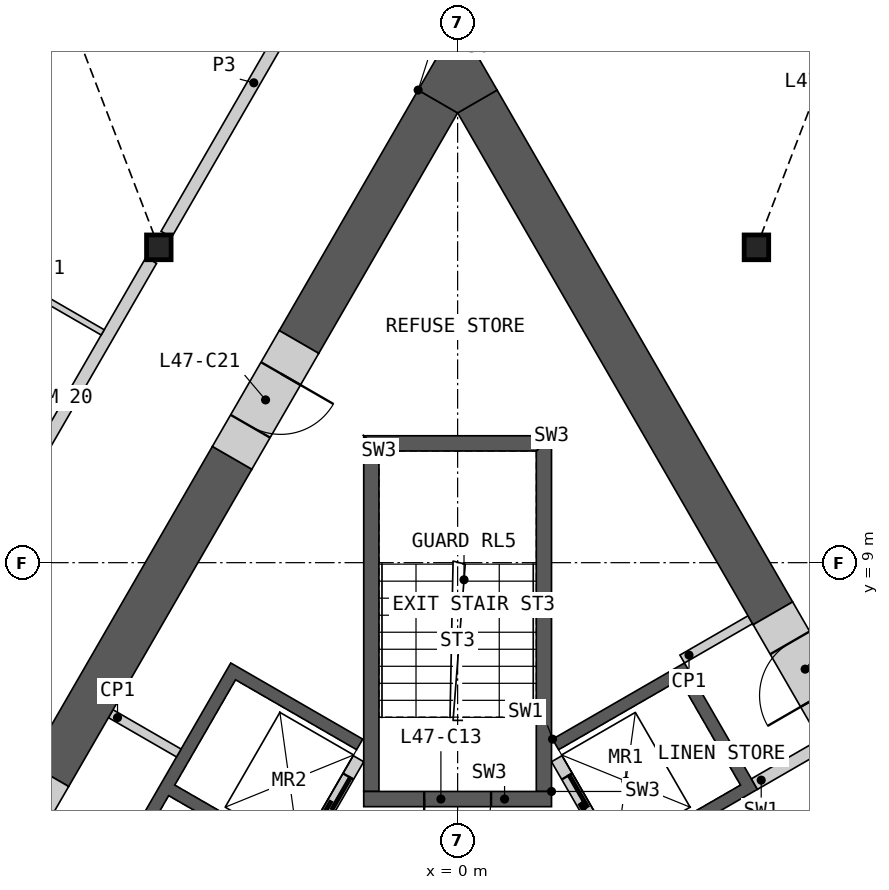
"""IFC4 building model, lengths in metres.
Left out: names, types, materials, properties, quantities, classifications, styles, units other than length and angle.
Written with IfcOpenShell. Run it as: python <this file> out.ifc"""

import sys

from ifc_helpers import new_model, si_unit, direction, frame, frame_2d, origin, origin_2d, place, context, subcontext, project, spatial, polyline, rectangle, i_section, outline, extrude, element, fill, save


model = new_model("IFC4")
c1 = context("Model", 3, precision=1e-05, world=origin(), true_north=direction((0.0, 1.0)))
c2 = subcontext(c1, "Body", "Model", "MODEL_VIEW")
j1 = project(units=[si_unit("LENGTHUNIT", "METRE"), si_unit("PLANEANGLEUNIT", "RADIAN")], contexts=[c1])
p1 = place(None, origin())
s1 = spatial("IfcSite", under=j1, at=p1, CompositionType="ELEMENT")
p2 = place(p1, origin())
s2 = spatial("IfcBuilding", under=s1, at=p2, CompositionType="ELEMENT")
p3 = place(p2, frame((0.0, 0.0, 212.4)))
s3 = spatial("IfcBuildingStorey", under=s2, at=p3, CompositionType="ELEMENT", Elevation=212.4)
for number, where, z_axis, x_axis in (
    (1, (-4.914, 14.186, 0.0), (0.0, 0.0, 1.0), (1.0, 0.0, 0.0)),
    (2, (4.914, 14.186, 0.0), (0.0, 0.0, 1.0), (1.0, 0.0, 0.0)),
):
    element("IfcColumn", number, at=place(p3, frame(where, z_axis=z_axis, x_axis=x_axis)), inside=s3, PredefinedType="COLUMN", context=c2, shape_type="SweptSolid", body=[
        extrude(i_section(OverallWidth=0.404, OverallDepth=0.407, WebThickness=0.027, FlangeThickness=0.044, at=origin_2d()), origin(), (0.0, 0.0, 1.0), 3.6),
    ])
p4 = place(p3, origin())
e3 = element("IfcWall", 3, at=p4, inside=s3, PredefinedType="SHEAR", context=c2, shape_type="SweptSolid", body=[
    extrude(outline(polyline([(1.561, 6.097), (3.731, 7.35), (4.931, 5.272), (2.76, 4.019), (2.66, 4.192), (4.652, 5.342), (3.652, 7.074), (1.66, 5.924), (1.561, 6.097)])), origin(), (0.0, 0.0, 1.0), 3.25),
])
p5 = place(p3, frame((5.817, -1.476, 0.0), z_axis=(0.0, 0.0, 1.0), x_axis=(-0.500002616675, 0.866023893041, 0.0)))
e4 = element("IfcWall", 4, at=p5, inside=s3, PredefinedType="SOLIDWALL", context=c2, shape_type="SweptSolid", body=[
    extrude(rectangle(XDim=8.373, YDim=0.2, at=frame_2d((4.187, 0.0))), origin(), (0.0, 0.0, 1.0), 3.25),
])
p6 = place(p5, frame((1.537, 0.0, 0.0)))
e5 = element("IfcOpeningElement", 5, at=p6, cuts=e4, PredefinedType="OPENING", context=c2, shape_type="SweptSolid", body=[
    extrude(rectangle(XDim=0.9, YDim=2.1, at=frame_2d((0.45, 1.05))), frame((0.0, 0.11, 0.0), z_axis=(0.0, -1.0, 0.0), x_axis=(1.0, 0.0, 0.0)), (0.0, 0.0, 1.0), 0.22),
])
p7 = place(p5, frame((4.837, 0.0, 0.0)))
e6 = element("IfcOpeningElement", 6, at=p7, cuts=e4, PredefinedType="OPENING", context=c2, shape_type="SweptSolid", body=[
    extrude(rectangle(XDim=0.9, YDim=2.1, at=frame_2d((0.45, 1.05))), frame((0.0, 0.11, 0.0), z_axis=(0.0, -1.0, 0.0), x_axis=(1.0, 0.0, 0.0)), (0.0, 0.0, 1.0), 0.22),
])
p8 = place(p5, frame((6.937, 0.0, 0.0)))
e7 = element("IfcOpeningElement", 7, at=p8, cuts=e4, PredefinedType="OPENING", context=c2, shape_type="SweptSolid", body=[
    extrude(rectangle(XDim=1.1, YDim=2.1, at=frame_2d((0.55, 1.05))), frame((0.0, 0.11, 0.0), z_axis=(0.0, -1.0, 0.0), x_axis=(1.0, 0.0, 0.0)), (0.0, 0.0, 1.0), 0.22),
])
p9 = place(p3, frame((4.881, 5.358, 0.0), z_axis=(0.0, 0.0, 1.0), x_axis=(0.866084958089, 0.499896834728, 0.0)))
e8 = element("IfcWall", 8, at=p9, inside=s3, PredefinedType="SHEAR", context=c2, shape_type="SweptSolid", body=[
    extrude(rectangle(XDim=1.293, YDim=0.2, at=frame_2d((0.646, 0.0))), origin(), (0.0, 0.0, 1.0), 3.25),
])
p10 = place(p3, origin())
e9 = element("IfcWall", 9, at=p10, inside=s3, PredefinedType="SHEAR", context=c2, shape_type="SweptSolid", body=[
    extrude(outline(polyline([(-4.96, 0.208), (-7.131, 1.461), (-3.731, 7.35), (-1.561, 6.097), (-1.66, 5.924), (-3.652, 7.074), (-4.652, 5.342), (-2.66, 4.192), (-2.76, 4.019), (-4.752, 5.169), (-5.752, 3.437), (-3.76, 2.287), (-3.861, 2.113), (-5.852, 3.263), (-6.852, 1.531), (-4.861, 0.381), (-4.96, 0.208)])), origin(), (0.0, 0.0, 1.0), 3.25),
])
p11 = place(p3, frame((-1.631, 5.776, 0.0), z_axis=(0.0, 0.0, 1.0), x_axis=(-0.499992876559, -0.866029516466, 0.0)))
e10 = element("IfcWall", 10, at=p11, inside=s3, PredefinedType="SOLIDWALL", context=c2, shape_type="SweptSolid", body=[
    extrude(rectangle(XDim=6.486, YDim=0.2, at=frame_2d((3.243, 0.0))), origin(), (0.0, 0.0, 1.0), 3.25),
])
p12 = place(p11, frame((0.337, 0.0, 0.0)))
e11 = element("IfcOpeningElement", 11, at=p12, cuts=e10, PredefinedType="OPENING", context=c2, shape_type="SweptSolid", body=[
    extrude(rectangle(XDim=1.1, YDim=2.1, at=frame_2d((0.55, 1.05))), frame((0.0, 0.11, 0.0), z_axis=(0.0, -1.0, 0.0), x_axis=(1.0, 0.0, 0.0)), (0.0, 0.0, 1.0), 0.22),
])
p13 = place(p11, frame((2.537, 0.0, 0.0)))
e12 = element("IfcOpeningElement", 12, at=p13, cuts=e10, PredefinedType="OPENING", context=c2, shape_type="SweptSolid", body=[
    extrude(rectangle(XDim=1.1, YDim=2.1, at=frame_2d((0.55, 1.05))), frame((0.0, 0.11, 0.0), z_axis=(0.0, -1.0, 0.0), x_axis=(1.0, 0.0, 0.0)), (0.0, 0.0, 1.0), 0.22),
])
p14 = place(p3, origin())
e13 = element("IfcWall", 13, at=p14, inside=s3, PredefinedType="SHEAR", context=c2, shape_type="SweptSolid", body=[
    extrude(outline(polyline([(1.544, 5.237), (1.544, 11.087), (1.294, 10.837), (1.294, 5.237), (1.544, 5.237)])), origin(), (0.0, 0.0, 1.0), 3.25),
])
p15 = place(p3, origin())
e14 = element("IfcWall", 14, at=p15, inside=s3, PredefinedType="SHEAR", context=c2, shape_type="SweptSolid", body=[
    extrude(outline(polyline([(1.544, 11.087), (-1.544, 11.087), (-1.294, 10.837), (1.294, 10.837), (1.544, 11.087)])), origin(), (0.0, 0.0, 1.0), 3.25),
])
p16 = place(p3, origin())
e15 = element("IfcWall", 15, at=p16, inside=s3, PredefinedType="SHEAR", context=c2, shape_type="SweptSolid", body=[
    extrude(outline(polyline([(-1.294, 10.837), (-1.544, 11.087), (-1.544, 5.237), (-1.294, 5.237), (-1.294, 10.837)])), origin(), (0.0, 0.0, 1.0), 3.25),
])
p17 = place(p3, frame((1.544, 5.112, 0.0), z_axis=(0.0, 0.0, 1.0), x_axis=(-1.0, 0.0, 0.0)))
e16 = element("IfcWall", 16, at=p17, inside=s3, PredefinedType="SHEAR", context=c2, shape_type="SweptSolid", body=[
    extrude(rectangle(XDim=3.088, YDim=0.25, at=frame_2d((1.544, 0.0))), origin(), (0.0, 0.0, 1.0), 3.25),
])
p18 = place(p17, frame((0.994, 0.0, 0.0)))
e17 = element("IfcOpeningElement", 17, at=p18, cuts=e16, PredefinedType="OPENING", context=c2, shape_type="SweptSolid", body=[
    extrude(rectangle(XDim=1.1, YDim=2.1, at=frame_2d((0.55, 1.05))), frame((0.0, 0.135, 0.0), z_axis=(0.0, -1.0, 0.0), x_axis=(1.0, 0.0, 0.0)), (0.0, 0.0, 1.0), 0.27),
])
for number, where, z_axis, x_axis in (
    (18, (3.693, 7.415, 0.0), (0.0, 0.0, 1.0), (0.866, 0.5, 0.0)),
    (19, (-5.705, 6.516, 0.0), (0.0, 0.0, 1.0), (0.866, -0.5, 0.0)),
):
    element("IfcWall", number, at=place(p3, frame(where, z_axis=z_axis, x_axis=x_axis)), inside=s3, PredefinedType="PARTITIONING", context=c2, shape_type="SweptSolid", body=[
        extrude(rectangle(XDim=1.293, YDim=0.15, at=frame_2d((0.646, 0.0))), origin(), (0.0, 0.0, 1.0), 3.25),
    ])
p19 = place(p3, frame((5.185, 8.167, 0.0), z_axis=(0.0, 0.0, 1.0), x_axis=(-0.500004344816, 0.866022895289, 0.0)))
e20 = element("IfcWall", 20, at=p19, inside=s3, PredefinedType="SHEAR", context=c2, shape_type="SweptSolid", body=[
    extrude(rectangle(XDim=9.721, YDim=0.75, at=frame_2d((4.861, 0.0))), origin(), (0.0, 0.0, 1.0), 3.25),
])
p20 = place(p3, frame((-3.708, 10.724, 0.0), z_axis=(0.0, 0.0, 1.0), x_axis=(-0.500021737671, -0.866012853171, 0.0)))
e21 = element("IfcWall", 21, at=p20, inside=s3, PredefinedType="SHEAR", context=c2, shape_type="SweptSolid", body=[
    extrude(rectangle(XDim=6.026, YDim=0.75, at=frame_2d((3.013, 0.0))), origin(), (0.0, 0.0, 1.0), 3.25),
])
p21 = place(p3, frame((-0.325, 16.585, 0.0), z_axis=(0.0, 0.0, 1.0), x_axis=(-0.499984617099, -0.866034284924, 0.0)))
e22 = element("IfcWall", 22, at=p21, inside=s3, PredefinedType="SHEAR", context=c2, shape_type="SweptSolid", body=[
    extrude(rectangle(XDim=4.568, YDim=0.75, at=frame_2d((2.284, 0.0))), origin(), (0.0, 0.0, 1.0), 3.25),
])
p22 = place(p3, origin())
e23 = element("IfcWall", 23, at=p22, inside=s3, PredefinedType="SHEAR", context=c2, shape_type="SweptSolid", body=[
    extrude(outline(polyline([(-0.649, 16.773), (0.0, 17.898), (0.649, 16.773), (0.0, 16.398), (-0.649, 16.773)])), origin(), (0.0, 0.0, 1.0), 3.25),
])
p23 = place(p3, frame((-6.721, 5.506, 0.0), z_axis=(0.0, 0.0, 1.0), x_axis=(-0.499946605688, -0.86605622881, 0.0)))
e24 = element("IfcWall", 24, at=p23, inside=s3, PredefinedType="SHEAR", context=c2, shape_type="SweptSolid", body=[
    extrude(rectangle(XDim=2.2, YDim=0.75, at=frame_2d((1.1, 0.0))), origin(), (0.0, 0.0, 1.0), 3.25),
])
p24 = place(p23, frame((0.6, 0.0, 0.0)))
e25 = element("IfcOpeningElement", 25, at=p24, cuts=e24, PredefinedType="OPENING", context=c2, shape_type="SweptSolid", body=[
    extrude(rectangle(XDim=1.0, YDim=2.1, at=frame_2d((0.5, 1.05))), frame((0.0, 0.385, 0.0), z_axis=(0.0, -1.0, 0.0), x_axis=(1.0, 0.0, 0.0)), (0.0, 0.0, 1.0), 0.77),
])
p25 = place(p3, frame((6.265, 6.296, 0.0), z_axis=(0.0, 0.0, 1.0), x_axis=(-0.500029011134, 0.866008653551, 0.0)))
e26 = element("IfcWall", 26, at=p25, inside=s3, PredefinedType="SHEAR", context=c2, shape_type="SweptSolid", body=[
    extrude(rectangle(XDim=2.16, YDim=0.75, at=frame_2d((1.08, 0.0))), origin(), (0.0, 0.0, 1.0), 3.25),
])
p26 = place(p25, frame((0.6, 0.0, 0.0)))
e27 = element("IfcOpeningElement", 27, at=p26, cuts=e26, PredefinedType="OPENING", context=c2, shape_type="SweptSolid", body=[
    extrude(rectangle(XDim=1.0, YDim=2.1, at=frame_2d((0.5, 1.05))), frame((0.0, 0.385, 0.0), z_axis=(0.0, -1.0, 0.0), x_axis=(1.0, 0.0, 0.0)), (0.0, 0.0, 1.0), 0.77),
])
p27 = place(p3, frame((-2.609, 12.629, 0.0), z_axis=(0.0, 0.0, 1.0), x_axis=(-0.500077893725, -0.86598042715, 0.0)))
e28 = element("IfcWall", 28, at=p27, inside=s3, PredefinedType="SHEAR", context=c2, shape_type="SweptSolid", body=[
    extrude(rectangle(XDim=2.2, YDim=0.75, at=frame_2d((1.1, 0.0))), origin(), (0.0, 0.0, 1.0), 3.25),
])
p28 = place(p27, frame((0.6, 0.0, 0.0)))
e29 = element("IfcOpeningElement", 29, at=p28, cuts=e28, PredefinedType="OPENING", context=c2, shape_type="SweptSolid", body=[
    extrude(rectangle(XDim=1.0, YDim=2.1, at=frame_2d((0.5, 1.05))), frame((0.0, 0.385, 0.0), z_axis=(0.0, -1.0, 0.0), x_axis=(1.0, 0.0, 0.0)), (0.0, 0.0, 1.0), 0.77),
])
p29 = place(p3, frame((5.377, 19.385, 0.0), z_axis=(0.0, 0.0, 1.0), x_axis=(0.500000757641, -0.86602496636, 0.0)))
e30 = element("IfcWall", 30, at=p29, inside=s3, PredefinedType="PARTITIONING", context=c2, shape_type="SweptSolid", body=[
    extrude(rectangle(XDim=28.198, YDim=0.2, at=frame_2d((14.099, 0.0))), origin(), (0.0, 0.0, 1.0), 3.25),
])
p30 = place(p29, frame((25.345, 0.0, 0.0)))
e31 = element("IfcOpeningElement", 31, at=p30, cuts=e30, PredefinedType="OPENING", context=c2, shape_type="SweptSolid", body=[
    extrude(rectangle(XDim=1.8, YDim=2.1, at=frame_2d((0.9, 1.05))), frame((0.0, 0.11, 0.0), z_axis=(0.0, -1.0, 0.0), x_axis=(1.0, 0.0, 0.0)), (0.0, 0.0, 1.0), 0.22),
])
p31 = place(p29, frame((19.621, 0.0, 0.0)))
e32 = element("IfcOpeningElement", 32, at=p31, cuts=e30, PredefinedType="OPENING", context=c2, shape_type="SweptSolid", body=[
    extrude(rectangle(XDim=1.0, YDim=2.1, at=frame_2d((0.5, 1.05))), frame((0.0, 0.11, 0.0), z_axis=(0.0, -1.0, 0.0), x_axis=(1.0, 0.0, 0.0)), (0.0, 0.0, 1.0), 0.22),
])
p32 = place(p29, frame((16.409, 0.0, 0.0)))
e33 = element("IfcOpeningElement", 33, at=p32, cuts=e30, PredefinedType="OPENING", context=c2, shape_type="SweptSolid", body=[
    extrude(rectangle(XDim=1.1, YDim=2.1, at=frame_2d((0.55, 1.05))), frame((0.0, 0.11, 0.0), z_axis=(0.0, -1.0, 0.0), x_axis=(1.0, 0.0, 0.0)), (0.0, 0.0, 1.0), 0.22),
])
p33 = place(p29, frame((1.452, 0.0, 0.0)))
e34 = element("IfcOpeningElement", 34, at=p33, cuts=e30, PredefinedType="OPENING", context=c2, shape_type="SweptSolid", body=[
    extrude(rectangle(XDim=0.95, YDim=2.1, at=frame_2d((0.475, 1.05))), frame((0.0, 0.11, 0.0), z_axis=(0.0, -1.0, 0.0), x_axis=(1.0, 0.0, 0.0)), (0.0, 0.0, 1.0), 0.22),
])
p34 = place(p3, frame((-9.705, 5.888, 0.0), z_axis=(0.0, 0.0, 1.0), x_axis=(0.50000393355, 0.866023132736, 0.0)))
e35 = element("IfcWall", 35, at=p34, inside=s3, PredefinedType="PARTITIONING", context=c2, shape_type="SweptSolid", body=[
    extrude(rectangle(XDim=9.335, YDim=0.2, at=frame_2d((4.667, 0.0))), origin(), (0.0, 0.0, 1.0), 3.25),
])
p35 = place(p34, frame((3.465, 0.0, 0.0)))
e36 = element("IfcOpeningElement", 36, at=p35, cuts=e35, PredefinedType="OPENING", context=c2, shape_type="SweptSolid", body=[
    extrude(rectangle(XDim=1.1, YDim=2.1, at=frame_2d((0.55, 1.05))), frame((0.0, 0.11, 0.0), z_axis=(0.0, -1.0, 0.0), x_axis=(1.0, 0.0, 0.0)), (0.0, 0.0, 1.0), 0.22),
])
p36 = place(p3, frame((-4.791, 14.4, 0.0), z_axis=(0.0, 0.0, 1.0), x_axis=(0.50000762079, 0.866021003874, 0.0)))
e37 = element("IfcWall", 37, at=p36, inside=s3, PredefinedType="PARTITIONING", context=c2, shape_type="SweptSolid", body=[
    extrude(rectangle(XDim=5.756, YDim=0.2, at=frame_2d((2.878, 0.0))), origin(), (0.0, 0.0, 1.0), 3.25),
])
p37 = place(p36, frame((4.304, 0.0, 0.0)))
e38 = element("IfcOpeningElement", 38, at=p37, cuts=e37, PredefinedType="OPENING", context=c2, shape_type="SweptSolid", body=[
    extrude(rectangle(XDim=1.1, YDim=2.1, at=frame_2d((0.55, 1.05))), frame((0.0, 0.11, 0.0), z_axis=(0.0, -1.0, 0.0), x_axis=(1.0, 0.0, 0.0)), (0.0, 0.0, 1.0), 0.22),
])
p38 = place(p3, frame((-7.959, 14.012, 0.0), z_axis=(0.0, 0.0, 1.0), x_axis=(0.866057815567, -0.499943856944, 0.0)))
e39 = element("IfcWall", 39, at=p38, inside=s3, PredefinedType="PARTITIONING", context=c2, shape_type="SweptSolid", body=[
    extrude(rectangle(XDim=2.45, YDim=0.1, at=frame_2d((1.225, 0.0))), origin(), (0.0, 0.0, 1.0), 2.404),
])
p39 = place(p8, origin())
e40 = element("IfcDoor", 40, at=p39, inside=s3, OperationType="SLIDING_TO_LEFT", PredefinedType="DOOR", context=c2, shape_type="SweptSolid", body=[
    extrude(rectangle(XDim=1.1, YDim=2.1, at=frame_2d((0.55, 1.05))), frame((0.0, 0.025, 0.0), z_axis=(0.0, -1.0, 0.0), x_axis=(1.0, 0.0, 0.0)), (0.0, 0.0, 1.0), 0.05),
])
fill(e7, e40)
p40 = place(p12, origin())
e41 = element("IfcDoor", 41, at=p40, inside=s3, OperationType="SLIDING_TO_LEFT", PredefinedType="DOOR", context=c2, shape_type="SweptSolid", body=[
    extrude(rectangle(XDim=1.1, YDim=2.1, at=frame_2d((0.55, 1.05))), frame((0.0, 0.025, 0.0), z_axis=(0.0, -1.0, 0.0), x_axis=(1.0, 0.0, 0.0)), (0.0, 0.0, 1.0), 0.05),
])
fill(e11, e41)
p41 = place(p18, origin())
e42 = element("IfcDoor", 42, at=p41, inside=s3, OperationType="SINGLE_SWING_RIGHT", PredefinedType="DOOR", context=c2, shape_type="SweptSolid", body=[
    extrude(rectangle(XDim=1.1, YDim=2.1, at=frame_2d((0.55, 1.05))), frame((0.0, 0.025, 0.0), z_axis=(0.0, -1.0, 0.0), x_axis=(1.0, 0.0, 0.0)), (0.0, 0.0, 1.0), 0.05),
])
fill(e17, e42)
p42 = place(p26, origin())
e43 = element("IfcDoor", 43, at=p42, inside=s3, OperationType="SINGLE_SWING_LEFT", PredefinedType="DOOR", context=c2, shape_type="SweptSolid", body=[
    extrude(rectangle(XDim=1.0, YDim=2.1, at=frame_2d((0.5, 1.05))), frame((0.0, 0.13, 0.0), z_axis=(0.0, -1.0, 0.0), x_axis=(1.0, 0.0, 0.0)), (0.0, 0.0, 1.0), 0.05),
])
fill(e27, e43)
p43 = place(p28, origin())
e44 = element("IfcDoor", 44, at=p43, inside=s3, OperationType="SINGLE_SWING_LEFT", PredefinedType="DOOR", context=c2, shape_type="SweptSolid", body=[
    extrude(rectangle(XDim=1.0, YDim=2.1, at=frame_2d((0.5, 1.05))), frame((0.0, 0.13, 0.0), z_axis=(0.0, -1.0, 0.0), x_axis=(1.0, 0.0, 0.0)), (0.0, 0.0, 1.0), 0.05),
])
fill(e29, e44)
save(model, sys.argv[1])
